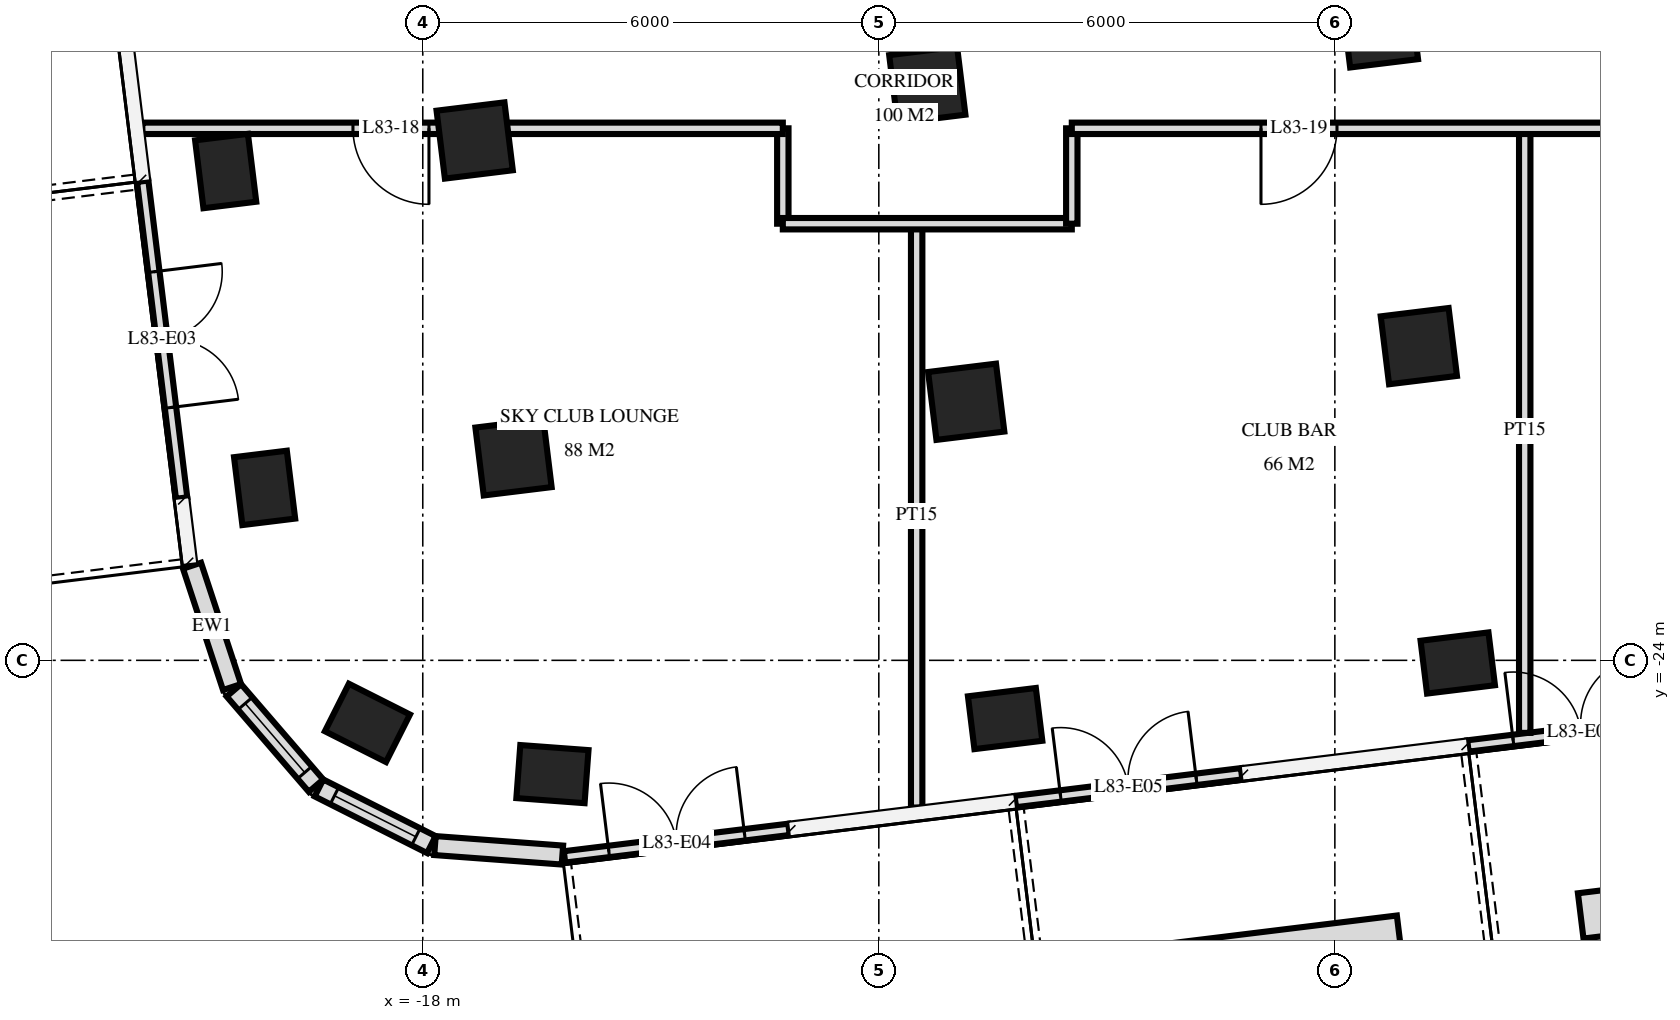
"""IFC4 building model, lengths in metres.
Left out: names, types, materials, properties, quantities, classifications, styles, units other than length and angle.
Written with IfcOpenShell. Run it as: python <this file> out.ifc"""

import sys

from ifc_helpers import new_model, si_unit, direction, frame, frame_2d, origin, origin_2d, place, context, subcontext, project, spatial, rectangle, extrude, element, fill, save


model = new_model("IFC4")
c1 = context("Model", 3, precision=1e-05, world=origin(), true_north=direction((0.0, 1.0)))
c2 = subcontext(c1, "Body", "Model", "MODEL_VIEW")
j1 = project(units=[si_unit("LENGTHUNIT", "METRE"), si_unit("PLANEANGLEUNIT", "RADIAN")], contexts=[c1])
p1 = place(None, origin())
s1 = spatial("IfcSite", under=j1, at=p1, CompositionType="ELEMENT")
p2 = place(p1, origin())
s2 = spatial("IfcBuilding", under=s1, at=p2, CompositionType="ELEMENT")
p3 = place(p2, frame((0.0, 0.0, 314.6)))
s3 = spatial("IfcBuildingStorey", under=s2, at=p3, CompositionType="ELEMENT", Elevation=314.6)
for number, where, z_axis, x_axis in (
    (1, (-20.593, -17.562, -0.28), (0.0, 0.0, 1.0), (-0.122, 0.993, 0.0)),
    (2, (-20.081, -21.731, -0.28), (0.0, 0.0, 1.0), (-0.122, 0.993, 0.0)),
    (3, (-18.728, -24.823, -0.28), (0.0, 0.0, 1.0), (-0.893, 0.45, 0.0)),
):
    element("IfcColumn", number, at=place(p3, frame(where, z_axis=z_axis, x_axis=x_axis)), inside=s3, PredefinedType="COLUMN", context=c2, shape_type="SweptSolid", body=[
        extrude(rectangle(XDim=0.9, YDim=0.7, at=origin_2d()), origin(), (0.0, 0.0, 1.0), 4.28),
    ])
for number, where, z_axis, x_axis in (
    (4, (-17.317, -17.16, -0.28), (0.0, 0.0, 1.0), (0.993, 0.122, 0.0)),
    (5, (-16.806, -21.329, -0.28), (0.0, 0.0, 1.0), (0.993, 0.122, 0.0)),
):
    element("IfcColumn", number, at=place(p3, frame(where, z_axis=z_axis, x_axis=x_axis)), inside=s3, PredefinedType="COLUMN", context=c2, shape_type="SweptSolid", body=[
        extrude(rectangle(XDim=0.9, YDim=0.9, at=origin_2d()), origin(), (0.0, 0.0, 1.0), 4.28),
    ])
p4 = place(p3, frame((-16.294, -25.497, -0.28), z_axis=(0.0, 0.0, 1.0), x_axis=(-0.997251478385, 0.074091084885, 0.0)))
e6 = element("IfcColumn", 6, at=p4, inside=s3, PredefinedType="COLUMN", context=c2, shape_type="SweptSolid", body=[
    extrude(rectangle(XDim=0.9, YDim=0.7, at=origin_2d()), origin(), (0.0, 0.0, 1.0), 4.28),
])
for number, where, z_axis, x_axis in (
    (7, (-11.362, -16.429, -0.28), (0.0, 0.0, 1.0), (0.993, 0.122, 0.0)),
    (8, (-10.85, -20.598, -0.28), (0.0, 0.0, 1.0), (0.993, 0.122, 0.0)),
):
    element("IfcColumn", number, at=place(p3, frame(where, z_axis=z_axis, x_axis=x_axis)), inside=s3, PredefinedType="COLUMN", context=c2, shape_type="SweptSolid", body=[
        extrude(rectangle(XDim=0.9, YDim=0.9, at=origin_2d()), origin(), (0.0, 0.0, 1.0), 4.28),
    ])
p5 = place(p3, frame((-10.338, -24.766, -0.28), z_axis=(0.0, 0.0, 1.0), x_axis=(0.992546151641, 0.121869343405, 0.0)))
e9 = element("IfcColumn", 9, at=p5, inside=s3, PredefinedType="COLUMN", context=c2, shape_type="SweptSolid", body=[
    extrude(rectangle(XDim=0.9, YDim=0.7, at=origin_2d()), origin(), (0.0, 0.0, 1.0), 4.28),
])
for number, where, z_axis, x_axis in (
    (10, (-5.407, -15.698, -0.28), (0.0, 0.0, 1.0), (0.993, 0.122, 0.0)),
    (11, (-4.895, -19.866, -0.28), (0.0, 0.0, 1.0), (0.993, 0.122, 0.0)),
):
    element("IfcColumn", number, at=place(p3, frame(where, z_axis=z_axis, x_axis=x_axis)), inside=s3, PredefinedType="COLUMN", context=c2, shape_type="SweptSolid", body=[
        extrude(rectangle(XDim=0.9, YDim=0.9, at=origin_2d()), origin(), (0.0, 0.0, 1.0), 4.28),
    ])
p6 = place(p3, frame((-4.383, -24.035, -0.28), z_axis=(0.0, 0.0, 1.0), x_axis=(0.992546151641, 0.121869343405, 0.0)))
e12 = element("IfcColumn", 12, at=p6, inside=s3, PredefinedType="COLUMN", context=c2, shape_type="SweptSolid", body=[
    extrude(rectangle(XDim=0.9, YDim=0.7, at=origin_2d()), origin(), (0.0, 0.0, 1.0), 4.28),
])
p7 = place(p3, frame((-21.685, -17.696, 0.0), z_axis=(0.0, 0.0, 1.0), x_axis=(0.121895320106, -0.992542961758, 0.0)))
e13 = element("IfcWall", 13, at=p7, inside=s3, PredefinedType="USERDEFINED", context=c2, shape_type="SweptSolid", body=[
    extrude(rectangle(XDim=4.2, YDim=0.15, at=frame_2d((2.1, 0.0))), origin(), (0.0, 0.0, 1.0), 3.72),
])
p8 = place(p7, frame((1.2, 0.0, 0.0)))
e14 = element("IfcOpeningElement", 14, at=p8, cuts=e13, PredefinedType="OPENING", context=c2, shape_type="SweptSolid", body=[
    extrude(rectangle(XDim=1.8, YDim=2.4, at=frame_2d((0.9, 1.2))), frame((0.0, 0.085, 0.0), z_axis=(0.0, -1.0, 0.0), x_axis=(1.0, 0.0, 0.0)), (0.0, 0.0, 1.0), 0.17),
])
p9 = place(p3, frame((-21.036, -22.755, 0.0), z_axis=(0.0, 0.0, 1.0), x_axis=(0.313046160822, -0.949737911844, 0.0)))
e15 = element("IfcWall", 15, at=p9, inside=s3, PredefinedType="SOLIDWALL", context=c2, shape_type="SweptSolid", body=[
    extrude(rectangle(XDim=1.681, YDim=0.25, at=frame_2d((0.841, 0.0))), origin(), (0.0, 0.0, 1.0), 3.72),
])
p10 = place(p3, frame((-20.485, -24.394, 0.0), z_axis=(0.0, 0.0, 1.0), x_axis=(0.652755886531, -0.757568315466, 0.0)))
e16 = element("IfcWall", 16, at=p10, inside=s3, PredefinedType="SOLIDWALL", context=c2, shape_type="SweptSolid", body=[
    extrude(rectangle(XDim=1.656, YDim=0.25, at=frame_2d((0.828, 0.0))), origin(), (0.0, 0.0, 1.0), 3.72),
])
p11 = place(p10, frame((0.228, 0.0, 0.9)))
e17 = element("IfcOpeningElement", 17, at=p11, cuts=e16, PredefinedType="OPENING", context=c2, shape_type="SweptSolid", body=[
    extrude(rectangle(XDim=1.2, YDim=1.5, at=frame_2d((0.6, 0.75))), frame((0.0, 0.135, 0.0), z_axis=(0.0, -1.0, 0.0), x_axis=(1.0, 0.0, 0.0)), (0.0, 0.0, 1.0), 0.27),
])
p12 = place(p3, frame((-19.366, -25.679, 0.0), z_axis=(0.0, 0.0, 1.0), x_axis=(0.893007580524, -0.450041621549, 0.0)))
e18 = element("IfcWall", 18, at=p12, inside=s3, PredefinedType="SOLIDWALL", context=c2, shape_type="SweptSolid", body=[
    extrude(rectangle(XDim=1.656, YDim=0.25, at=frame_2d((0.828, 0.0))), origin(), (0.0, 0.0, 1.0), 3.72),
])
p13 = place(p12, frame((0.228, 0.0, 0.9)))
e19 = element("IfcOpeningElement", 19, at=p13, cuts=e18, PredefinedType="OPENING", context=c2, shape_type="SweptSolid", body=[
    extrude(rectangle(XDim=1.2, YDim=1.5, at=frame_2d((0.6, 0.75))), frame((0.0, 0.135, 0.0), z_axis=(0.0, -1.0, 0.0), x_axis=(1.0, 0.0, 0.0)), (0.0, 0.0, 1.0), 0.27),
])
p14 = place(p3, frame((-17.84, -26.438, 0.0), z_axis=(0.0, 0.0, 1.0), x_axis=(0.997254267475, -0.074053534713, 0.0)))
e20 = element("IfcWall", 20, at=p14, inside=s3, PredefinedType="SOLIDWALL", context=c2, shape_type="SweptSolid", body=[
    extrude(rectangle(XDim=1.681, YDim=0.25, at=frame_2d((0.841, 0.0))), origin(), (0.0, 0.0, 1.0), 3.72),
])
p15 = place(p3, frame((-16.135, -26.586, 0.0), z_axis=(0.0, 0.0, 1.0), x_axis=(0.992549375183, 0.121843086893, 0.0)))
e21 = element("IfcWall", 21, at=p15, inside=s3, PredefinedType="USERDEFINED", context=c2, shape_type="SweptSolid", body=[
    extrude(rectangle(XDim=2.976, YDim=0.15, at=frame_2d((1.488, 0.0))), origin(), (0.0, 0.0, 1.0), 3.72),
])
p16 = place(p15, frame((0.588, 0.0, 0.0)))
e22 = element("IfcOpeningElement", 22, at=p16, cuts=e21, PredefinedType="OPENING", context=c2, shape_type="SweptSolid", body=[
    extrude(rectangle(XDim=1.8, YDim=2.4, at=frame_2d((0.9, 1.2))), frame((0.0, 0.085, 0.0), z_axis=(0.0, -1.0, 0.0), x_axis=(1.0, 0.0, 0.0)), (0.0, 0.0, 1.0), 0.17),
])
p17 = place(p3, frame((-10.204, -25.858, 0.0), z_axis=(0.0, 0.0, 1.0), x_axis=(0.99255088108, 0.121830819037, 0.0)))
e23 = element("IfcWall", 23, at=p17, inside=s3, PredefinedType="USERDEFINED", context=c2, shape_type="SweptSolid", body=[
    extrude(rectangle(XDim=3.0, YDim=0.15, at=frame_2d((1.5, 0.0))), origin(), (0.0, 0.0, 1.0), 3.72),
])
p18 = place(p17, frame((0.6, 0.0, 0.0)))
e24 = element("IfcOpeningElement", 24, at=p18, cuts=e23, PredefinedType="OPENING", context=c2, shape_type="SweptSolid", body=[
    extrude(rectangle(XDim=1.8, YDim=2.4, at=frame_2d((0.9, 1.2))), frame((0.0, 0.085, 0.0), z_axis=(0.0, -1.0, 0.0), x_axis=(1.0, 0.0, 0.0)), (0.0, 0.0, 1.0), 0.17),
])
p19 = place(p3, frame((-4.249, -25.127, 0.0), z_axis=(0.0, 0.0, 1.0), x_axis=(0.99255088108, 0.121830819037, 0.0)))
e25 = element("IfcWall", 25, at=p19, inside=s3, PredefinedType="USERDEFINED", context=c2, shape_type="SweptSolid", body=[
    extrude(rectangle(XDim=3.0, YDim=0.15, at=frame_2d((1.5, 0.0))), origin(), (0.0, 0.0, 1.0), 3.72),
])
p20 = place(p19, frame((0.6, 0.0, 0.0)))
e26 = element("IfcOpeningElement", 26, at=p20, cuts=e25, PredefinedType="OPENING", context=c2, shape_type="SweptSolid", body=[
    extrude(rectangle(XDim=1.8, YDim=2.4, at=frame_2d((0.9, 1.2))), frame((0.0, 0.085, 0.0), z_axis=(0.0, -1.0, 0.0), x_axis=(1.0, 0.0, 0.0)), (0.0, 0.0, 1.0), 0.17),
])
for number, where, z_axis, x_axis in (
    (27, (-5.148, -27.655, 0.0), (0.0, 0.0, 1.0), (-0.993, -0.122, 0.0)),
    (28, (0.808, -26.924, 0.0), (0.0, 0.0, 1.0), (-0.993, -0.122, 0.0)),
):
    element("IfcWall", number, at=place(p3, frame(where, z_axis=z_axis, x_axis=x_axis)), inside=s3, PredefinedType="USERDEFINED", context=c2, shape_type="SweptSolid", body=[
        extrude(rectangle(XDim=3.6, YDim=0.6, at=frame_2d((1.8, 0.0))), origin(), (0.0, 0.0, 1.0), 0.65),
    ])
p21 = place(p3, frame((-3.502, -24.955, 0.0), z_axis=(0.0, 0.0, 1.0), x_axis=(0.0, 1.0, 0.0)))
e29 = element("IfcWall", 29, at=p21, inside=s3, PredefinedType="PARTITIONING", context=c2, shape_type="SweptSolid", body=[
    extrude(rectangle(XDim=7.955, YDim=0.15, at=frame_2d((3.977, 0.0))), origin(), (0.0, 0.0, 1.0), 3.72),
])
p22 = place(p3, frame((-9.461, -18.255, 0.0), z_axis=(0.0, 0.0, 1.0), x_axis=(0.0, 1.0, 0.0)))
e30 = element("IfcWall", 30, at=p22, inside=s3, PredefinedType="PARTITIONING", context=c2, shape_type="SweptSolid", body=[
    extrude(rectangle(XDim=1.255, YDim=0.15, at=frame_2d((0.627, 0.0))), origin(), (0.0, 0.0, 1.0), 3.72),
])
p23 = place(p3, frame((-11.502, -25.937, 0.0), z_axis=(0.0, 0.0, 1.0), x_axis=(0.0, 1.0, 0.0)))
e31 = element("IfcWall", 31, at=p23, inside=s3, PredefinedType="PARTITIONING", context=c2, shape_type="SweptSolid", body=[
    extrude(rectangle(XDim=7.682, YDim=0.15, at=frame_2d((3.841, 0.0))), origin(), (0.0, 0.0, 1.0), 3.72),
])
p24 = place(p3, frame((-13.263, -18.255, 0.0), z_axis=(0.0, 0.0, 1.0), x_axis=(0.0, 1.0, 0.0)))
e32 = element("IfcWall", 32, at=p24, inside=s3, PredefinedType="PARTITIONING", context=c2, shape_type="SweptSolid", body=[
    extrude(rectangle(XDim=1.255, YDim=0.15, at=frame_2d((0.627, 0.0))), origin(), (0.0, 0.0, 1.0), 3.72),
])
p25 = place(p3, frame((-13.263, -18.255, 0.0), z_axis=(0.0, 0.0, 1.0), x_axis=(1.0, 0.0, 0.0)))
e33 = element("IfcWall", 33, at=p25, inside=s3, PredefinedType="PARTITIONING", context=c2, shape_type="SweptSolid", body=[
    extrude(rectangle(XDim=3.802, YDim=0.15, at=frame_2d((1.901, 0.0))), origin(), (0.0, 0.0, 1.0), 3.72),
])
p26 = place(p3, frame((-21.689, -17.0, 0.0), z_axis=(0.0, 0.0, 1.0), x_axis=(1.0, 0.0, 0.0)))
e34 = element("IfcWall", 34, at=p26, inside=s3, PredefinedType="PARTITIONING", context=c2, shape_type="SweptSolid", body=[
    extrude(rectangle(XDim=8.427, YDim=0.15, at=frame_2d((4.213, 0.0))), origin(), (0.0, 0.0, 1.0), 3.72),
])
p27 = place(p26, frame((2.771, 0.0, 0.0)))
e35 = element("IfcOpeningElement", 35, at=p27, cuts=e34, PredefinedType="OPENING", context=c2, shape_type="SweptSolid", body=[
    extrude(rectangle(XDim=1.0, YDim=2.1, at=frame_2d((0.5, 1.05))), frame((0.0, 0.085, 0.0), z_axis=(0.0, -1.0, 0.0), x_axis=(1.0, 0.0, 0.0)), (0.0, 0.0, 1.0), 0.17),
])
p28 = place(p3, frame((-9.461, -17.0, 0.0), z_axis=(0.0, 0.0, 1.0), x_axis=(1.0, 0.0, 0.0)))
e36 = element("IfcWall", 36, at=p28, inside=s3, PredefinedType="PARTITIONING", context=c2, shape_type="SweptSolid", body=[
    extrude(rectangle(XDim=32.747, YDim=0.15, at=frame_2d((16.373, 0.0))), origin(), (0.0, 0.0, 1.0), 3.72),
])
p29 = place(p28, frame((2.489, 0.0, 0.0)))
e37 = element("IfcOpeningElement", 37, at=p29, cuts=e36, PredefinedType="OPENING", context=c2, shape_type="SweptSolid", body=[
    extrude(rectangle(XDim=1.0, YDim=2.1, at=frame_2d((0.5, 1.05))), frame((0.0, 0.085, 0.0), z_axis=(0.0, -1.0, 0.0), x_axis=(1.0, 0.0, 0.0)), (0.0, 0.0, 1.0), 0.17),
])
p30 = place(p28, frame((8.959, 0.0, 0.0)))
e38 = element("IfcOpeningElement", 38, at=p30, cuts=e36, PredefinedType="OPENING", context=c2, shape_type="SweptSolid", body=[
    extrude(rectangle(XDim=1.0, YDim=2.1, at=frame_2d((0.5, 1.05))), frame((0.0, 0.085, 0.0), z_axis=(0.0, -1.0, 0.0), x_axis=(1.0, 0.0, 0.0)), (0.0, 0.0, 1.0), 0.17),
])
p31 = place(p28, frame((16.989, 0.0, 0.0)))
e39 = element("IfcOpeningElement", 39, at=p31, cuts=e36, PredefinedType="OPENING", context=c2, shape_type="SweptSolid", body=[
    extrude(rectangle(XDim=1.0, YDim=2.1, at=frame_2d((0.5, 1.05))), frame((0.0, 0.085, 0.0), z_axis=(0.0, -1.0, 0.0), x_axis=(1.0, 0.0, 0.0)), (0.0, 0.0, 1.0), 0.17),
])
p32 = place(p28, frame((23.033, 0.0, 0.0)))
e40 = element("IfcOpeningElement", 40, at=p32, cuts=e36, PredefinedType="OPENING", context=c2, shape_type="SweptSolid", body=[
    extrude(rectangle(XDim=1.0, YDim=2.1, at=frame_2d((0.5, 1.05))), frame((0.0, 0.085, 0.0), z_axis=(0.0, -1.0, 0.0), x_axis=(1.0, 0.0, 0.0)), (0.0, 0.0, 1.0), 0.17),
])
p33 = place(p28, frame((28.989, 0.0, 0.0)))
e41 = element("IfcOpeningElement", 41, at=p33, cuts=e36, PredefinedType="OPENING", context=c2, shape_type="SweptSolid", body=[
    extrude(rectangle(XDim=1.0, YDim=2.1, at=frame_2d((0.5, 1.05))), frame((0.0, 0.085, 0.0), z_axis=(0.0, -1.0, 0.0), x_axis=(1.0, 0.0, 0.0)), (0.0, 0.0, 1.0), 0.17),
])
p34 = place(p8, origin())
e42 = element("IfcDoor", 42, at=p34, inside=s3, OperationType="DOUBLE_DOOR_SINGLE_SWING", PredefinedType="DOOR", context=c2, shape_type="SweptSolid", body=[
    extrude(rectangle(XDim=1.8, YDim=2.4, at=frame_2d((0.9, 1.2))), frame((0.0, 0.025, 0.0), z_axis=(0.0, -1.0, 0.0), x_axis=(1.0, 0.0, 0.0)), (0.0, 0.0, 1.0), 0.05),
])
fill(e14, e42)
p35 = place(p11, origin())
e43 = element("IfcWindow", 43, at=p35, inside=s3, PartitioningType="SINGLE_PANEL", PredefinedType="WINDOW", context=c2, shape_type="SweptSolid", body=[
    extrude(rectangle(XDim=1.2, YDim=1.5, at=frame_2d((0.6, 0.75))), frame((0.0, 0.03, 0.0), z_axis=(0.0, -1.0, 0.0), x_axis=(1.0, 0.0, 0.0)), (0.0, 0.0, 1.0), 0.06),
])
fill(e17, e43)
p36 = place(p13, origin())
e44 = element("IfcWindow", 44, at=p36, inside=s3, PartitioningType="SINGLE_PANEL", PredefinedType="WINDOW", context=c2, shape_type="SweptSolid", body=[
    extrude(rectangle(XDim=1.2, YDim=1.5, at=frame_2d((0.6, 0.75))), frame((0.0, 0.03, 0.0), z_axis=(0.0, -1.0, 0.0), x_axis=(1.0, 0.0, 0.0)), (0.0, 0.0, 1.0), 0.06),
])
fill(e19, e44)
p37 = place(p16, origin())
e45 = element("IfcDoor", 45, at=p37, inside=s3, OperationType="DOUBLE_DOOR_SINGLE_SWING", PredefinedType="DOOR", context=c2, shape_type="SweptSolid", body=[
    extrude(rectangle(XDim=1.8, YDim=2.4, at=frame_2d((0.9, 1.2))), frame((0.0, 0.025, 0.0), z_axis=(0.0, -1.0, 0.0), x_axis=(1.0, 0.0, 0.0)), (0.0, 0.0, 1.0), 0.05),
])
fill(e22, e45)
p38 = place(p18, origin())
e46 = element("IfcDoor", 46, at=p38, inside=s3, OperationType="DOUBLE_DOOR_SINGLE_SWING", PredefinedType="DOOR", context=c2, shape_type="SweptSolid", body=[
    extrude(rectangle(XDim=1.8, YDim=2.4, at=frame_2d((0.9, 1.2))), frame((0.0, 0.025, 0.0), z_axis=(0.0, -1.0, 0.0), x_axis=(1.0, 0.0, 0.0)), (0.0, 0.0, 1.0), 0.05),
])
fill(e24, e46)
p39 = place(p20, origin())
e47 = element("IfcDoor", 47, at=p39, inside=s3, OperationType="DOUBLE_DOOR_SINGLE_SWING", PredefinedType="DOOR", context=c2, shape_type="SweptSolid", body=[
    extrude(rectangle(XDim=1.8, YDim=2.4, at=frame_2d((0.9, 1.2))), frame((0.0, 0.025, 0.0), z_axis=(0.0, -1.0, 0.0), x_axis=(1.0, 0.0, 0.0)), (0.0, 0.0, 1.0), 0.05),
])
fill(e26, e47)
p40 = place(p27, frame((0.5, 0.0, 0.0), z_axis=(0.0, 0.0, 1.0), x_axis=(-1.0, 0.0, 0.0)))
e48 = element("IfcDoor", 48, at=p40, inside=s3, OperationType="SINGLE_SWING_RIGHT", PredefinedType="DOOR", context=c2, shape_type="SweptSolid", body=[
    extrude(rectangle(XDim=1.0, YDim=2.1, at=frame_2d((0.0, 1.05))), frame((0.0, -0.025, 0.0), z_axis=(0.0, 1.0, 0.0), x_axis=(-1.0, 0.0, 0.0)), (0.0, 0.0, 1.0), 0.05),
])
fill(e35, e48)
p41 = place(p29, frame((0.5, 0.0, 0.0), z_axis=(0.0, 0.0, 1.0), x_axis=(-1.0, 0.0, 0.0)))
e49 = element("IfcDoor", 49, at=p41, inside=s3, OperationType="SINGLE_SWING_LEFT", PredefinedType="DOOR", context=c2, shape_type="SweptSolid", body=[
    extrude(rectangle(XDim=1.0, YDim=2.1, at=frame_2d((0.0, 1.05))), frame((0.0, -0.025, 0.0), z_axis=(0.0, 1.0, 0.0), x_axis=(-1.0, 0.0, 0.0)), (0.0, 0.0, 1.0), 0.05),
])
fill(e37, e49)
save(model, sys.argv[1])
